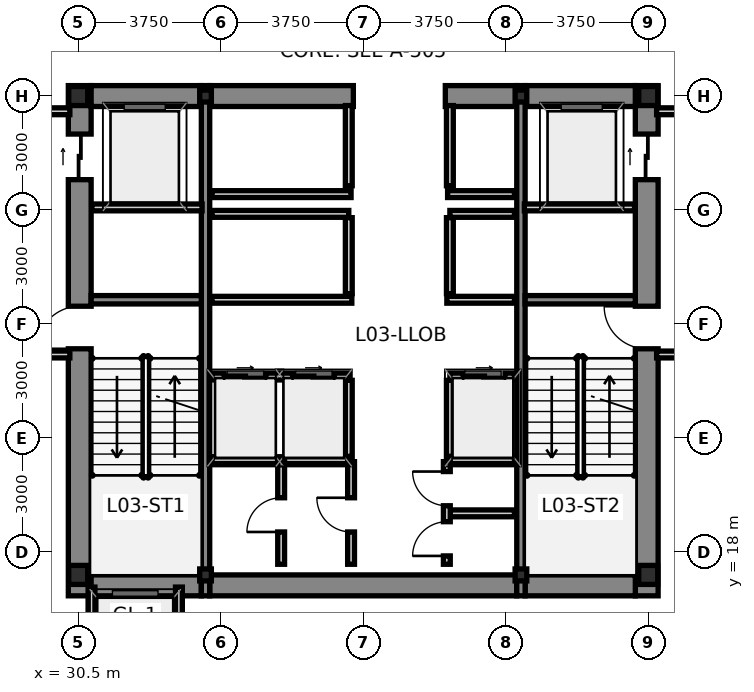
"""IFC4 building model, lengths in metres.
Left out: names, types, materials, properties, quantities, classifications, styles, units other than length and angle.
Written with IfcOpenShell. Run it as: python <this file> out.ifc"""

import sys

from ifc_helpers import new_model, si_unit, direction, frame, frame_2d, origin, origin_2d, place, context, subcontext, project, spatial, rectangle, i_section, extrude, source, transform, mapped, element, fill, save


model = new_model("IFC4")
c1 = context("Model", 3, precision=1e-05, world=origin(), true_north=direction((0.0, 1.0)))
c2 = subcontext(c1, "Body", "Model", "MODEL_VIEW")
j1 = project(units=[si_unit("LENGTHUNIT", "METRE"), si_unit("PLANEANGLEUNIT", "RADIAN")], contexts=[c1])
p1 = place(None, origin())
s1 = spatial("IfcSite", under=j1, at=p1, CompositionType="ELEMENT")
p2 = place(p1, origin())
s2 = spatial("IfcBuilding", under=s1, at=p2, CompositionType="ELEMENT")
p3 = place(p2, frame((0.0, 0.0, 14.7)))
s3 = spatial("IfcBuildingStorey", under=s2, at=p3, CompositionType="ELEMENT", Elevation=14.7)
m1 = source(origin(), c2, "Body", "SweptSolid", [
    extrude(i_section(OverallWidth=0.5, OverallDepth=0.5, WebThickness=0.028, FlangeThickness=0.04, at=origin_2d()), origin(), (0.0, 0.0, 1.0), 4.2),
])
for number, where, z_axis, x_axis in (
    (1, (30.5, 17.4, 0.0), (0.0, 0.0, 1.0), (1.0, 0.0, 0.0)),
    (2, (45.5, 17.4, 0.0), (0.0, 0.0, 1.0), (1.0, 0.0, 0.0)),
    (3, (45.5, 30.0, 0.0), (0.0, 0.0, 1.0), (1.0, 0.0, 0.0)),
    (4, (30.5, 30.0, 0.0), (0.0, 0.0, 1.0), (1.0, 0.0, 0.0)),
):
    element("IfcColumn", number, at=place(p3, frame(where, z_axis=z_axis, x_axis=x_axis)), inside=s3, PredefinedType="COLUMN", context=c2, shape_type="MappedRepresentation", body=[
        mapped(m1, transform((0.0, 0.0, 0.0), scale=1.0)),
    ])
m2 = source(origin(), c2, "Body", "SweptSolid", [
    extrude(i_section(OverallWidth=0.307, OverallDepth=0.315, WebThickness=0.012, FlangeThickness=0.019, at=origin_2d()), origin(), (0.0, 0.0, 1.0), 4.2),
])
for number, where, z_axis, x_axis in (
    (5, (33.85, 17.4, 0.0), (0.0, 0.0, 1.0), (1.0, 0.0, 0.0)),
    (6, (42.15, 17.4, 0.0), (0.0, 0.0, 1.0), (1.0, 0.0, 0.0)),
    (7, (33.85, 30.0, 0.0), (0.0, 0.0, 1.0), (1.0, 0.0, 0.0)),
    (8, (42.15, 30.0, 0.0), (0.0, 0.0, 1.0), (1.0, 0.0, 0.0)),
):
    element("IfcColumn", number, at=place(p3, frame(where, z_axis=z_axis, x_axis=x_axis)), inside=s3, PredefinedType="COLUMN", context=c2, shape_type="MappedRepresentation", body=[
        mapped(m2, transform((0.0, 0.0, 0.0), scale=1.0)),
    ])
p4 = place(p3, frame((30.54, 16.85, 0.0), z_axis=(0.0, 0.0, 1.0), x_axis=(0.0, 1.0, 0.0)))
e9 = element("IfcWall", 9, at=p4, inside=s3, PredefinedType="SHEAR", context=c2, shape_type="SweptSolid", body=[
    extrude(rectangle(XDim=13.425, YDim=0.6, at=frame_2d((6.712, 0.0))), origin(), (0.0, 0.0, 1.0), 4.2),
])
p5 = place(p4, frame((6.5, 0.0, 0.0)))
e10 = element("IfcOpeningElement", 10, at=p5, cuts=e9, PredefinedType="OPENING", context=c2, shape_type="SweptSolid", body=[
    extrude(rectangle(XDim=1.12, YDim=2.15, at=frame_2d((0.56, 1.075))), frame((0.0, 0.312, 0.0), z_axis=(0.0, -1.0, 0.0), x_axis=(1.0, 0.0, 0.0)), (0.0, 0.0, 1.0), 0.624),
])
p6 = place(p4, frame((10.95, 0.0, 0.0)))
e11 = element("IfcOpeningElement", 11, at=p6, cuts=e9, PredefinedType="OPENING", context=c2, shape_type="SweptSolid", body=[
    extrude(rectangle(XDim=1.2, YDim=2.2, at=frame_2d((0.6, 1.1))), frame((0.0, 0.312, 0.0), z_axis=(0.0, -1.0, 0.0), x_axis=(1.0, 0.0, 0.0)), (0.0, 0.0, 1.0), 0.624),
])
p7 = place(p3, frame((45.46, 16.85, 0.0), z_axis=(0.0, 0.0, 1.0), x_axis=(0.0, 1.0, 0.0)))
e12 = element("IfcWall", 12, at=p7, inside=s3, PredefinedType="SHEAR", context=c2, shape_type="SweptSolid", body=[
    extrude(rectangle(XDim=13.425, YDim=0.6, at=frame_2d((6.712, 0.0))), origin(), (0.0, 0.0, 1.0), 4.2),
])
p8 = place(p7, frame((6.5, 0.0, 0.0)))
e13 = element("IfcOpeningElement", 13, at=p8, cuts=e12, PredefinedType="OPENING", context=c2, shape_type="SweptSolid", body=[
    extrude(rectangle(XDim=1.12, YDim=2.15, at=frame_2d((0.56, 1.075))), frame((0.0, 0.312, 0.0), z_axis=(0.0, -1.0, 0.0), x_axis=(1.0, 0.0, 0.0)), (0.0, 0.0, 1.0), 0.624),
])
p9 = place(p7, frame((10.95, 0.0, 0.0)))
e14 = element("IfcOpeningElement", 14, at=p9, cuts=e12, PredefinedType="OPENING", context=c2, shape_type="SweptSolid", body=[
    extrude(rectangle(XDim=1.2, YDim=2.2, at=frame_2d((0.6, 1.1))), frame((0.0, 0.312, 0.0), z_axis=(0.0, -1.0, 0.0), x_axis=(1.0, 0.0, 0.0)), (0.0, 0.0, 1.0), 0.624),
])
p10 = place(p3, frame((30.84, 17.125, 0.0), z_axis=(0.0, 0.0, 1.0), x_axis=(1.0, 0.0, 0.0)))
e15 = element("IfcWall", 15, at=p10, inside=s3, PredefinedType="SHEAR", context=c2, shape_type="SweptSolid", body=[
    extrude(rectangle(XDim=2.9, YDim=0.55, at=frame_2d((1.45, 0.0))), origin(), (0.0, 0.0, 1.0), 4.2),
])
p11 = place(p3, frame((33.96, 17.125, 0.0), z_axis=(0.0, 0.0, 1.0), x_axis=(1.0, 0.0, 0.0)))
e16 = element("IfcWall", 16, at=p11, inside=s3, PredefinedType="SHEAR", context=c2, shape_type="SweptSolid", body=[
    extrude(rectangle(XDim=8.08, YDim=0.55, at=frame_2d((4.04, 0.0))), origin(), (0.0, 0.0, 1.0), 4.2),
])
for number, where, z_axis, x_axis in (
    (17, (42.26, 17.125, 0.0), (0.0, 0.0, 1.0), (1.0, 0.0, 0.0)),
    (18, (30.84, 30.0, 0.0), (0.0, 0.0, 1.0), (1.0, 0.0, 0.0)),
):
    element("IfcWall", number, at=place(p3, frame(where, z_axis=z_axis, x_axis=x_axis)), inside=s3, PredefinedType="SHEAR", context=c2, shape_type="SweptSolid", body=[
        extrude(rectangle(XDim=2.9, YDim=0.55, at=frame_2d((1.45, 0.0))), origin(), (0.0, 0.0, 1.0), 4.2),
    ])
p12 = place(p3, frame((33.96, 30.0, 0.0), z_axis=(0.0, 0.0, 1.0), x_axis=(1.0, 0.0, 0.0)))
e19 = element("IfcWall", 19, at=p12, inside=s3, PredefinedType="SHEAR", context=c2, shape_type="SweptSolid", body=[
    extrude(rectangle(XDim=3.78, YDim=0.55, at=frame_2d((1.89, 0.0))), origin(), (0.0, 0.0, 1.0), 4.2),
])
p13 = place(p3, frame((40.16, 30.0, 0.0), z_axis=(0.0, 0.0, 1.0), x_axis=(1.0, 0.0, 0.0)))
e20 = element("IfcWall", 20, at=p13, inside=s3, PredefinedType="SHEAR", context=c2, shape_type="SweptSolid", body=[
    extrude(rectangle(XDim=1.88, YDim=0.55, at=frame_2d((0.94, 0.0))), origin(), (0.0, 0.0, 1.0), 4.2),
])
p14 = place(p3, frame((42.26, 30.0, 0.0), z_axis=(0.0, 0.0, 1.0), x_axis=(1.0, 0.0, 0.0)))
e21 = element("IfcWall", 21, at=p14, inside=s3, PredefinedType="SHEAR", context=c2, shape_type="SweptSolid", body=[
    extrude(rectangle(XDim=2.9, YDim=0.55, at=frame_2d((1.45, 0.0))), origin(), (0.0, 0.0, 1.0), 4.2),
])
for number, where, z_axis, x_axis in (
    (22, (33.85, 16.85, 0.0), (0.0, 0.0, 1.0), (0.0, 1.0, 0.0)),
    (23, (42.15, 16.85, 0.0), (0.0, 0.0, 1.0), (0.0, 1.0, 0.0)),
):
    element("IfcWall", number, at=place(p3, frame(where, z_axis=z_axis, x_axis=x_axis)), inside=s3, PredefinedType="SHEAR", context=c2, shape_type="SweptSolid", body=[
        extrude(rectangle(XDim=13.425, YDim=0.22, at=frame_2d((6.712, 0.0))), origin(), (0.0, 0.0, 1.0), 4.2),
    ])
for number, where, z_axis, x_axis in (
    (24, (30.84, 24.64, 0.0), (0.0, 0.0, 1.0), (1.0, 0.0, 0.0)),
    (25, (42.26, 24.64, 0.0), (0.0, 0.0, 1.0), (1.0, 0.0, 0.0)),
):
    element("IfcWall", number, at=place(p3, frame(where, z_axis=z_axis, x_axis=x_axis)), inside=s3, PredefinedType="SHEAR", context=c2, shape_type="SweptSolid", body=[
        extrude(rectangle(XDim=2.9, YDim=0.22, at=frame_2d((1.45, 0.0))), origin(), (0.0, 0.0, 1.0), 4.2),
    ])
p15 = place(p3, frame((30.85, 14.42, 0.0), z_axis=(0.0, 0.0, 1.0), x_axis=(0.0, 1.0, 0.0)))
e26 = element("IfcWall", 26, at=p15, inside=s3, PredefinedType="PARTITIONING", context=c2, shape_type="SweptSolid", body=[
    extrude(rectangle(XDim=2.66, YDim=0.18, at=frame_2d((1.33, 0.0))), origin(), (0.0, 0.0, 1.0), 3.253),
])
p16 = place(p3, frame((33.15, 14.42, 0.0), z_axis=(0.0, 0.0, 1.0), x_axis=(0.0, 1.0, 0.0)))
e27 = element("IfcWall", 27, at=p16, inside=s3, PredefinedType="PARTITIONING", context=c2, shape_type="SweptSolid", body=[
    extrude(rectangle(XDim=2.66, YDim=0.18, at=frame_2d((1.33, 0.0))), origin(), (0.0, 0.0, 1.0), 3.88),
])
p17 = place(p3, frame((34.02, 22.62, 0.0), z_axis=(0.0, 0.0, 1.0), x_axis=(1.0, 0.0, 0.0)))
e28 = element("IfcWall", 28, at=p17, inside=s3, PredefinedType="PARTITIONING", context=c2, shape_type="SweptSolid", body=[
    extrude(rectangle(XDim=3.6, YDim=0.18, at=frame_2d((1.8, 0.0))), origin(), (0.0, 0.0, 1.0), 3.88),
])
p18 = place(p17, frame((0.32, 0.0, 0.0)))
e29 = element("IfcOpeningElement", 29, at=p18, cuts=e28, PredefinedType="OPENING", context=c2, shape_type="SweptSolid", body=[
    extrude(rectangle(XDim=1.1, YDim=2.2, at=frame_2d((0.55, 1.1))), frame((0.0, 0.102, 0.0), z_axis=(0.0, -1.0, 0.0), x_axis=(1.0, 0.0, 0.0)), (0.0, 0.0, 1.0), 0.204),
])
p19 = place(p17, frame((2.12, 0.0, 0.0)))
e30 = element("IfcOpeningElement", 30, at=p19, cuts=e28, PredefinedType="OPENING", context=c2, shape_type="SweptSolid", body=[
    extrude(rectangle(XDim=1.1, YDim=2.2, at=frame_2d((0.55, 1.1))), frame((0.0, 0.102, 0.0), z_axis=(0.0, -1.0, 0.0), x_axis=(1.0, 0.0, 0.0)), (0.0, 0.0, 1.0), 0.204),
])
p20 = place(p3, frame((40.28, 22.62, 0.0), z_axis=(0.0, 0.0, 1.0), x_axis=(1.0, 0.0, 0.0)))
e31 = element("IfcWall", 31, at=p20, inside=s3, PredefinedType="PARTITIONING", context=c2, shape_type="SweptSolid", body=[
    extrude(rectangle(XDim=1.7, YDim=0.18, at=frame_2d((0.85, 0.0))), origin(), (0.0, 0.0, 1.0), 3.88),
])
p21 = place(p20, frame((0.35, 0.0, 0.0)))
e32 = element("IfcOpeningElement", 32, at=p21, cuts=e31, PredefinedType="OPENING", context=c2, shape_type="SweptSolid", body=[
    extrude(rectangle(XDim=1.1, YDim=2.2, at=frame_2d((0.55, 1.1))), frame((0.0, 0.102, 0.0), z_axis=(0.0, -1.0, 0.0), x_axis=(1.0, 0.0, 0.0)), (0.0, 0.0, 1.0), 0.204),
])
for number, where, z_axis, x_axis in (
    (33, (37.62, 20.52, 0.0), (0.0, 0.0, 1.0), (0.0, 1.0, 0.0)),
    (34, (40.28, 20.52, 0.0), (0.0, 0.0, 1.0), (0.0, 1.0, 0.0)),
):
    element("IfcWall", number, at=place(p3, frame(where, z_axis=z_axis, x_axis=x_axis)), inside=s3, PredefinedType="PARTITIONING", context=c2, shape_type="SweptSolid", body=[
        extrude(rectangle(XDim=2.0, YDim=0.18, at=frame_2d((1.0, 0.0))), origin(), (0.0, 0.0, 1.0), 3.88),
    ])
p22 = place(p3, frame((34.02, 26.9, 0.0), z_axis=(0.0, 0.0, 1.0), x_axis=(1.0, 0.0, 0.0)))
e35 = element("IfcWall", 35, at=p22, inside=s3, PredefinedType="PARTITIONING", context=c2, shape_type="SweptSolid", body=[
    extrude(rectangle(XDim=3.6, YDim=0.18, at=frame_2d((1.8, 0.0))), origin(), (0.0, 0.0, 1.0), 3.88),
])
p23 = place(p3, frame((40.28, 26.9, 0.0), z_axis=(0.0, 0.0, 1.0), x_axis=(1.0, 0.0, 0.0)))
e36 = element("IfcWall", 36, at=p23, inside=s3, PredefinedType="PARTITIONING", context=c2, shape_type="SweptSolid", body=[
    extrude(rectangle(XDim=1.7, YDim=0.18, at=frame_2d((0.85, 0.0))), origin(), (0.0, 0.0, 1.0), 3.88),
])
for number, where, z_axis, x_axis in (
    (37, (37.62, 24.8, 0.0), (0.0, 0.0, 1.0), (0.0, 1.0, 0.0)),
    (38, (40.28, 24.8, 0.0), (0.0, 0.0, 1.0), (0.0, 1.0, 0.0)),
):
    element("IfcWall", number, at=place(p3, frame(where, z_axis=z_axis, x_axis=x_axis)), inside=s3, PredefinedType="PARTITIONING", context=c2, shape_type="SweptSolid", body=[
        extrude(rectangle(XDim=2.0, YDim=0.18, at=frame_2d((1.0, 0.0))), origin(), (0.0, 0.0, 1.0), 3.88),
    ])
p24 = place(p3, frame((34.02, 24.64, 0.0), z_axis=(0.0, 0.0, 1.0), x_axis=(1.0, 0.0, 0.0)))
e39 = element("IfcWall", 39, at=p24, inside=s3, PredefinedType="PARTITIONING", context=c2, shape_type="SweptSolid", body=[
    extrude(rectangle(XDim=3.68, YDim=0.18, at=frame_2d((1.84, 0.0))), origin(), (0.0, 0.0, 1.0), 3.88),
])
p25 = place(p3, frame((40.2, 24.64, 0.0), z_axis=(0.0, 0.0, 1.0), x_axis=(1.0, 0.0, 0.0)))
e40 = element("IfcWall", 40, at=p25, inside=s3, PredefinedType="PARTITIONING", context=c2, shape_type="SweptSolid", body=[
    extrude(rectangle(XDim=1.78, YDim=0.18, at=frame_2d((0.89, 0.0))), origin(), (0.0, 0.0, 1.0), 3.88),
])
p26 = place(p3, frame((34.02, 27.42, 0.0), z_axis=(0.0, 0.0, 1.0), x_axis=(1.0, 0.0, 0.0)))
e41 = element("IfcWall", 41, at=p26, inside=s3, PredefinedType="PARTITIONING", context=c2, shape_type="SweptSolid", body=[
    extrude(rectangle(XDim=3.66, YDim=0.18, at=frame_2d((1.83, 0.0))), origin(), (0.0, 0.0, 1.0), 3.88),
])
p27 = place(p3, frame((40.22, 27.42, 0.0), z_axis=(0.0, 0.0, 1.0), x_axis=(1.0, 0.0, 0.0)))
e42 = element("IfcWall", 42, at=p27, inside=s3, PredefinedType="PARTITIONING", context=c2, shape_type="SweptSolid", body=[
    extrude(rectangle(XDim=1.76, YDim=0.18, at=frame_2d((0.88, 0.0))), origin(), (0.0, 0.0, 1.0), 3.88),
])
for number, where, z_axis, x_axis in (
    (43, (37.62, 27.64, 0.0), (0.0, 0.0, 1.0), (0.0, 1.0, 0.0)),
    (44, (40.28, 27.64, 0.0), (0.0, 0.0, 1.0), (0.0, 1.0, 0.0)),
):
    element("IfcWall", number, at=place(p3, frame(where, z_axis=z_axis, x_axis=x_axis)), inside=s3, PredefinedType="PARTITIONING", context=c2, shape_type="SweptSolid", body=[
        extrude(rectangle(XDim=2.11, YDim=0.18, at=frame_2d((1.055, 0.0))), origin(), (0.0, 0.0, 1.0), 3.88),
    ])
p28 = place(p3, frame((27.52, 23.2, 0.0), z_axis=(0.0, 0.0, 1.0), x_axis=(1.0, 0.0, 0.0)))
e45 = element("IfcWall", 45, at=p28, inside=s3, PredefinedType="PARTITIONING", context=c2, shape_type="SweptSolid", body=[
    extrude(rectangle(XDim=2.76, YDim=0.18, at=frame_2d((1.38, 0.0))), origin(), (0.0, 0.0, 1.0), 3.88),
])
p29 = place(p3, frame((27.52, 29.6, 0.0), z_axis=(0.0, 0.0, 1.0), x_axis=(1.0, 0.0, 0.0)))
e46 = element("IfcWall", 46, at=p29, inside=s3, PredefinedType="PARTITIONING", context=c2, shape_type="SweptSolid", body=[
    extrude(rectangle(XDim=2.76, YDim=0.18, at=frame_2d((1.38, 0.0))), origin(), (0.0, 0.0, 1.0), 3.253),
])
p30 = place(p3, frame((45.72, 23.2, 0.0), z_axis=(0.0, 0.0, 1.0), x_axis=(1.0, 0.0, 0.0)))
e47 = element("IfcWall", 47, at=p30, inside=s3, PredefinedType="PARTITIONING", context=c2, shape_type="SweptSolid", body=[
    extrude(rectangle(XDim=2.76, YDim=0.18, at=frame_2d((1.38, 0.0))), origin(), (0.0, 0.0, 1.0), 3.88),
])
p31 = place(p3, frame((45.72, 29.6, 0.0), z_axis=(0.0, 0.0, 1.0), x_axis=(1.0, 0.0, 0.0)))
e48 = element("IfcWall", 48, at=p31, inside=s3, PredefinedType="PARTITIONING", context=c2, shape_type="SweptSolid", body=[
    extrude(rectangle(XDim=2.76, YDim=0.18, at=frame_2d((1.38, 0.0))), origin(), (0.0, 0.0, 1.0), 3.253),
])
for number, where, z_axis, x_axis in (
    (49, (30.86, 27.07, 0.0), (0.0, 0.0, 1.0), (1.0, 0.0, 0.0)),
    (50, (42.24, 27.07, 0.0), (0.0, 0.0, 1.0), (1.0, 0.0, 0.0)),
):
    element("IfcWall", number, at=place(p3, frame(where, z_axis=z_axis, x_axis=x_axis)), inside=s3, PredefinedType="PARTITIONING", context=c2, shape_type="SweptSolid", body=[
        extrude(rectangle(XDim=2.9, YDim=0.18, at=frame_2d((1.45, 0.0))), origin(), (0.0, 0.0, 1.0), 3.88),
    ])
p32 = place(p3, frame((34.02, 20.42, 0.0), z_axis=(0.0, 0.0, 1.0), x_axis=(1.0, 0.0, 0.0)))
e51 = element("IfcWall", 51, at=p32, inside=s3, PredefinedType="PARTITIONING", context=c2, shape_type="SweptSolid", body=[
    extrude(rectangle(XDim=3.64, YDim=0.18, at=frame_2d((1.82, 0.0))), origin(), (0.0, 0.0, 1.0), 3.88),
])
p33 = place(p3, frame((40.22, 20.42, 0.0), z_axis=(0.0, 0.0, 1.0), x_axis=(1.0, 0.0, 0.0)))
e52 = element("IfcWall", 52, at=p33, inside=s3, PredefinedType="PARTITIONING", context=c2, shape_type="SweptSolid", body=[
    extrude(rectangle(XDim=1.76, YDim=0.18, at=frame_2d((0.88, 0.0))), origin(), (0.0, 0.0, 1.0), 3.88),
])
p34 = place(p3, frame((35.84, 17.68, 0.0), z_axis=(0.0, 0.0, 1.0), x_axis=(0.0, 1.0, 0.0)))
e53 = element("IfcWall", 53, at=p34, inside=s3, PredefinedType="PARTITIONING", context=c2, shape_type="SweptSolid", body=[
    extrude(rectangle(XDim=2.7, YDim=0.18, at=frame_2d((1.35, 0.0))), origin(), (0.0, 0.0, 1.0), 3.88),
])
p35 = place(p34, frame((0.85, 0.0, 0.0)))
e54 = element("IfcOpeningElement", 54, at=p35, cuts=e53, PredefinedType="OPENING", context=c2, shape_type="SweptSolid", body=[
    extrude(rectangle(XDim=0.9, YDim=2.1, at=frame_2d((0.45, 1.05))), frame((0.0, 0.102, 0.0), z_axis=(0.0, -1.0, 0.0), x_axis=(1.0, 0.0, 0.0)), (0.0, 0.0, 1.0), 0.204),
])
p36 = place(p3, frame((37.68, 17.68, 0.0), z_axis=(0.0, 0.0, 1.0), x_axis=(0.0, 1.0, 0.0)))
e55 = element("IfcWall", 55, at=p36, inside=s3, PredefinedType="PARTITIONING", context=c2, shape_type="SweptSolid", body=[
    extrude(rectangle(XDim=2.7, YDim=0.18, at=frame_2d((1.35, 0.0))), origin(), (0.0, 0.0, 1.0), 3.88),
])
p37 = place(p36, frame((0.85, 0.0, 0.0)))
e56 = element("IfcOpeningElement", 56, at=p37, cuts=e55, PredefinedType="OPENING", context=c2, shape_type="SweptSolid", body=[
    extrude(rectangle(XDim=0.9, YDim=2.1, at=frame_2d((0.45, 1.05))), frame((0.0, 0.102, 0.0), z_axis=(0.0, -1.0, 0.0), x_axis=(1.0, 0.0, 0.0)), (0.0, 0.0, 1.0), 0.204),
])
p38 = place(p3, frame((40.28, 19.02, 0.0), z_axis=(0.0, 0.0, 1.0), x_axis=(1.0, 0.0, 0.0)))
e57 = element("IfcWall", 57, at=p38, inside=s3, PredefinedType="PARTITIONING", context=c2, shape_type="SweptSolid", body=[
    extrude(rectangle(XDim=1.7, YDim=0.18, at=frame_2d((0.85, 0.0))), origin(), (0.0, 0.0, 1.0), 3.88),
])
p39 = place(p3, frame((40.2, 17.68, 0.0), z_axis=(0.0, 0.0, 1.0), x_axis=(0.0, 1.0, 0.0)))
e58 = element("IfcWall", 58, at=p39, inside=s3, PredefinedType="PARTITIONING", context=c2, shape_type="SweptSolid", body=[
    extrude(rectangle(XDim=2.7, YDim=0.18, at=frame_2d((1.35, 0.0))), origin(), (0.0, 0.0, 1.0), 3.88),
])
p40 = place(p39, frame((0.22, 0.0, 0.0)))
e59 = element("IfcOpeningElement", 59, at=p40, cuts=e58, PredefinedType="OPENING", context=c2, shape_type="SweptSolid", body=[
    extrude(rectangle(XDim=0.9, YDim=2.1, at=frame_2d((0.45, 1.05))), frame((0.0, 0.102, 0.0), z_axis=(0.0, -1.0, 0.0), x_axis=(1.0, 0.0, 0.0)), (0.0, 0.0, 1.0), 0.204),
])
p41 = place(p39, frame((1.54, 0.0, 0.0)))
e60 = element("IfcOpeningElement", 60, at=p41, cuts=e58, PredefinedType="OPENING", context=c2, shape_type="SweptSolid", body=[
    extrude(rectangle(XDim=0.9, YDim=2.1, at=frame_2d((0.45, 1.05))), frame((0.0, 0.102, 0.0), z_axis=(0.0, -1.0, 0.0), x_axis=(1.0, 0.0, 0.0)), (0.0, 0.0, 1.0), 0.204),
])
p42 = place(p5, origin())
e61 = element("IfcDoor", 61, at=p42, inside=s3, OperationType="SINGLE_SWING_LEFT", PredefinedType="DOOR", context=c2, shape_type="SweptSolid", body=[
    extrude(rectangle(XDim=1.12, YDim=2.15, at=frame_2d((0.56, 1.075))), frame((0.0, 0.025, 0.0), z_axis=(0.0, -1.0, 0.0), x_axis=(1.0, 0.0, 0.0)), (0.0, 0.0, 1.0), 0.05),
])
fill(e10, e61)
p43 = place(p6, origin())
e62 = element("IfcDoor", 62, at=p43, inside=s3, OperationType="SLIDING_TO_LEFT", PredefinedType="DOOR", context=c2, shape_type="SweptSolid", body=[
    extrude(rectangle(XDim=1.2, YDim=2.2, at=frame_2d((0.6, 1.1))), frame((0.0, 0.025, 0.0), z_axis=(0.0, -1.0, 0.0), x_axis=(1.0, 0.0, 0.0)), (0.0, 0.0, 1.0), 0.05),
])
fill(e11, e62)
p44 = place(p8, origin())
e63 = element("IfcDoor", 63, at=p44, inside=s3, OperationType="SINGLE_SWING_RIGHT", PredefinedType="DOOR", context=c2, shape_type="SweptSolid", body=[
    extrude(rectangle(XDim=1.12, YDim=2.15, at=frame_2d((0.56, 1.075))), frame((0.0, 0.025, 0.0), z_axis=(0.0, -1.0, 0.0), x_axis=(1.0, 0.0, 0.0)), (0.0, 0.0, 1.0), 0.05),
])
fill(e13, e63)
p45 = place(p9, origin())
e64 = element("IfcDoor", 64, at=p45, inside=s3, OperationType="SLIDING_TO_RIGHT", PredefinedType="DOOR", context=c2, shape_type="SweptSolid", body=[
    extrude(rectangle(XDim=1.2, YDim=2.2, at=frame_2d((0.6, 1.1))), frame((0.0, 0.025, 0.0), z_axis=(0.0, -1.0, 0.0), x_axis=(1.0, 0.0, 0.0)), (0.0, 0.0, 1.0), 0.05),
])
fill(e14, e64)
p46 = place(p18, origin())
e65 = element("IfcDoor", 65, at=p46, inside=s3, OperationType="SLIDING_TO_LEFT", PredefinedType="DOOR", context=c2, shape_type="SweptSolid", body=[
    extrude(rectangle(XDim=1.1, YDim=2.2, at=frame_2d((0.55, 1.1))), frame((0.0, 0.025, 0.0), z_axis=(0.0, -1.0, 0.0), x_axis=(1.0, 0.0, 0.0)), (0.0, 0.0, 1.0), 0.05),
])
fill(e29, e65)
p47 = place(p19, origin())
e66 = element("IfcDoor", 66, at=p47, inside=s3, OperationType="SLIDING_TO_RIGHT", PredefinedType="DOOR", context=c2, shape_type="SweptSolid", body=[
    extrude(rectangle(XDim=1.1, YDim=2.2, at=frame_2d((0.55, 1.1))), frame((0.0, 0.025, 0.0), z_axis=(0.0, -1.0, 0.0), x_axis=(1.0, 0.0, 0.0)), (0.0, 0.0, 1.0), 0.05),
])
fill(e30, e66)
p48 = place(p21, origin())
e67 = element("IfcDoor", 67, at=p48, inside=s3, OperationType="SLIDING_TO_LEFT", PredefinedType="DOOR", context=c2, shape_type="SweptSolid", body=[
    extrude(rectangle(XDim=1.1, YDim=2.2, at=frame_2d((0.55, 1.1))), frame((0.0, 0.025, 0.0), z_axis=(0.0, -1.0, 0.0), x_axis=(1.0, 0.0, 0.0)), (0.0, 0.0, 1.0), 0.05),
])
fill(e32, e67)
p49 = place(p35, origin())
e68 = element("IfcDoor", 68, at=p49, inside=s3, OperationType="SINGLE_SWING_LEFT", PredefinedType="DOOR", context=c2, shape_type="SweptSolid", body=[
    extrude(rectangle(XDim=0.9, YDim=2.1, at=frame_2d((0.45, 1.05))), frame((0.0, 0.025, 0.0), z_axis=(0.0, -1.0, 0.0), x_axis=(1.0, 0.0, 0.0)), (0.0, 0.0, 1.0), 0.05),
])
fill(e54, e68)
p50 = place(p37, origin())
e69 = element("IfcDoor", 69, at=p50, inside=s3, OperationType="SINGLE_SWING_RIGHT", PredefinedType="DOOR", context=c2, shape_type="SweptSolid", body=[
    extrude(rectangle(XDim=0.9, YDim=2.1, at=frame_2d((0.45, 1.05))), frame((0.0, 0.025, 0.0), z_axis=(0.0, -1.0, 0.0), x_axis=(1.0, 0.0, 0.0)), (0.0, 0.0, 1.0), 0.05),
])
fill(e56, e69)
p51 = place(p40, origin())
e70 = element("IfcDoor", 70, at=p51, inside=s3, OperationType="SINGLE_SWING_LEFT", PredefinedType="DOOR", context=c2, shape_type="SweptSolid", body=[
    extrude(rectangle(XDim=0.9, YDim=2.1, at=frame_2d((0.45, 1.05))), frame((0.0, 0.025, 0.0), z_axis=(0.0, -1.0, 0.0), x_axis=(1.0, 0.0, 0.0)), (0.0, 0.0, 1.0), 0.05),
])
fill(e59, e70)
p52 = place(p41, origin())
e71 = element("IfcDoor", 71, at=p52, inside=s3, OperationType="SINGLE_SWING_RIGHT", PredefinedType="DOOR", context=c2, shape_type="SweptSolid", body=[
    extrude(rectangle(XDim=0.9, YDim=2.1, at=frame_2d((0.45, 1.05))), frame((0.0, 0.025, 0.0), z_axis=(0.0, -1.0, 0.0), x_axis=(1.0, 0.0, 0.0)), (0.0, 0.0, 1.0), 0.05),
])
fill(e60, e71)
save(model, sys.argv[1])
